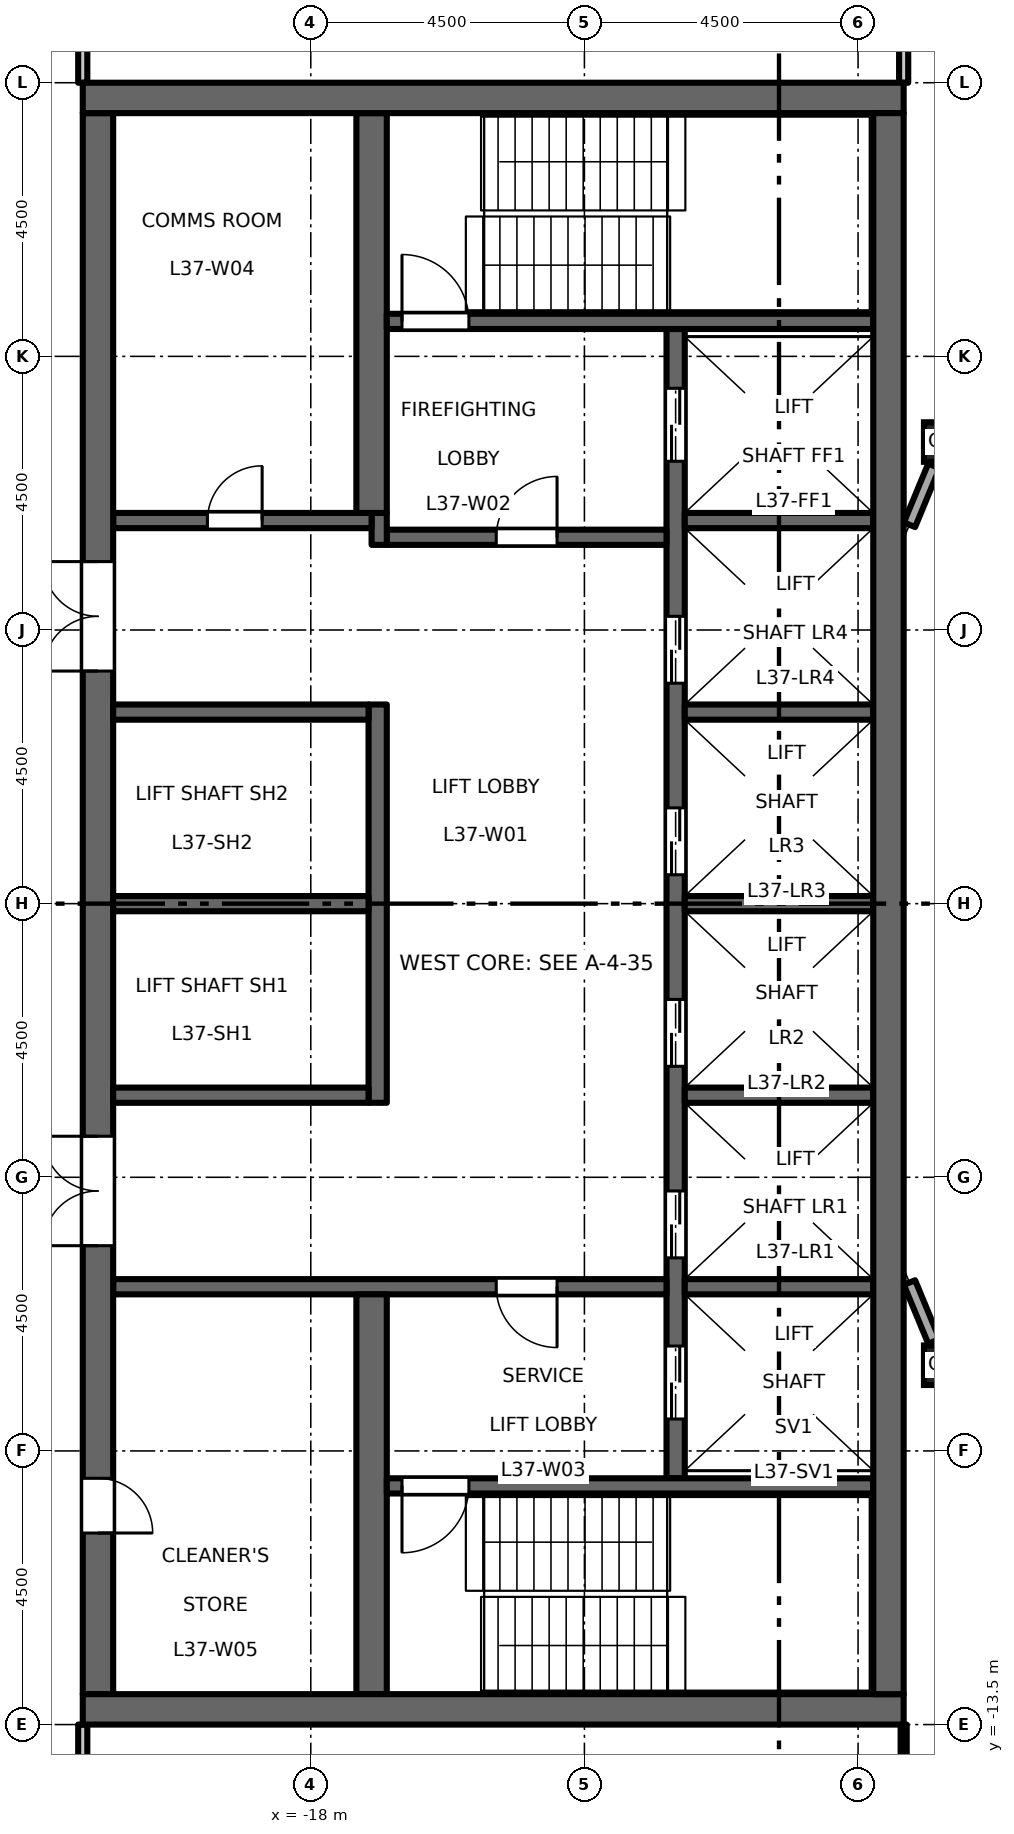
"""IFC4 building model, lengths in metres.
Left out: names, types, materials, properties, quantities, classifications, styles, units other than length and angle.
Written with IfcOpenShell. Run it as: python <this file> out.ifc"""

import sys

from ifc_helpers import new_model, si_unit, direction, frame, frame_2d, origin, origin_2d, place, context, subcontext, project, spatial, rectangle, hollow_rectangle, extrude, element, fill, save


model = new_model("IFC4")
c1 = context("Model", 3, precision=1e-05, world=origin(), true_north=direction((0.0, 1.0)))
c2 = subcontext(c1, "Body", "Model", "MODEL_VIEW")
j1 = project(units=[si_unit("LENGTHUNIT", "METRE"), si_unit("PLANEANGLEUNIT", "RADIAN")], contexts=[c1])
p1 = place(None, origin())
s1 = spatial("IfcSite", under=j1, at=p1, CompositionType="ELEMENT")
p2 = place(p1, origin())
s2 = spatial("IfcBuilding", under=s1, at=p2, CompositionType="ELEMENT")
p3 = place(p2, frame((0.0, 0.0, 172.2)))
s3 = spatial("IfcBuildingStorey", under=s2, at=p3, CompositionType="ELEMENT", Elevation=172.2)
for number, where, z_axis, x_axis in (
    (1, (-7.591, -7.591, 0.0), (0.0, 0.0, 1.0), (1.0, 0.0, 0.0)),
    (2, (-7.591, 7.591, 0.0), (0.0, 0.0, 1.0), (1.0, 0.0, 0.0)),
):
    element("IfcColumn", number, at=place(p3, frame(where, z_axis=z_axis, x_axis=x_axis)), inside=s3, PredefinedType="COLUMN", context=c2, shape_type="SweptSolid", body=[
        extrude(hollow_rectangle(XDim=0.65, YDim=0.65, WallThickness=0.036, at=origin_2d()), origin(), (0.0, 0.0, 1.0), 4.5),
    ])
p4 = place(p3, frame((-12.0, -9.45, 0.0), z_axis=(0.0, 0.0, 1.0), x_axis=(0.0, 1.0, 0.0)))
e3 = element("IfcWall", 3, at=p4, inside=s3, PredefinedType="SHEAR", context=c2, shape_type="SweptSolid", body=[
    extrude(rectangle(XDim=18.9, YDim=0.3, at=frame_2d((9.45, 0.0))), origin(), (0.0, 0.0, 1.0), 4.35),
])
p5 = place(p4, frame((3.625, 0.0, 0.0)))
e4 = element("IfcOpeningElement", 4, at=p5, cuts=e3, PredefinedType="OPENING", context=c2, shape_type="SweptSolid", body=[
    extrude(rectangle(XDim=1.1, YDim=2.1, at=frame_2d((0.55, 1.05))), frame((0.0, 0.16, 0.0), z_axis=(0.0, -1.0, 0.0), x_axis=(1.0, 0.0, 0.0)), (0.0, 0.0, 1.0), 0.32),
])
p6 = place(p4, frame((6.775, 0.0, 0.0)))
e5 = element("IfcOpeningElement", 5, at=p6, cuts=e3, PredefinedType="OPENING", context=c2, shape_type="SweptSolid", body=[
    extrude(rectangle(XDim=1.1, YDim=2.1, at=frame_2d((0.55, 1.05))), frame((0.0, 0.16, 0.0), z_axis=(0.0, -1.0, 0.0), x_axis=(1.0, 0.0, 0.0)), (0.0, 0.0, 1.0), 0.32),
])
p7 = place(p4, frame((9.925, 0.0, 0.0)))
e6 = element("IfcOpeningElement", 6, at=p7, cuts=e3, PredefinedType="OPENING", context=c2, shape_type="SweptSolid", body=[
    extrude(rectangle(XDim=1.1, YDim=2.1, at=frame_2d((0.55, 1.05))), frame((0.0, 0.16, 0.0), z_axis=(0.0, -1.0, 0.0), x_axis=(1.0, 0.0, 0.0)), (0.0, 0.0, 1.0), 0.32),
])
p8 = place(p4, frame((13.075, 0.0, 0.0)))
e7 = element("IfcOpeningElement", 7, at=p8, cuts=e3, PredefinedType="OPENING", context=c2, shape_type="SweptSolid", body=[
    extrude(rectangle(XDim=1.1, YDim=2.1, at=frame_2d((0.55, 1.05))), frame((0.0, 0.16, 0.0), z_axis=(0.0, -1.0, 0.0), x_axis=(1.0, 0.0, 0.0)), (0.0, 0.0, 1.0), 0.32),
])
p9 = place(p4, frame((16.725, 0.0, 0.0)))
e8 = element("IfcOpeningElement", 8, at=p9, cuts=e3, PredefinedType="OPENING", context=c2, shape_type="SweptSolid", body=[
    extrude(rectangle(XDim=1.2, YDim=2.1, at=frame_2d((0.6, 1.05))), frame((0.0, 0.16, 0.0), z_axis=(0.0, -1.0, 0.0), x_axis=(1.0, 0.0, 0.0)), (0.0, 0.0, 1.0), 0.32),
])
p10 = place(p4, frame((0.975, 0.0, 0.0)))
e9 = element("IfcOpeningElement", 9, at=p10, cuts=e3, PredefinedType="OPENING", context=c2, shape_type="SweptSolid", body=[
    extrude(rectangle(XDim=1.2, YDim=2.1, at=frame_2d((0.6, 1.05))), frame((0.0, 0.16, 0.0), z_axis=(0.0, -1.0, 0.0), x_axis=(1.0, 0.0, 0.0)), (0.0, 0.0, 1.0), 0.32),
])
p11 = place(p3, frame((-12.15, 6.025, 0.0), z_axis=(0.0, 0.0, 1.0), x_axis=(-1.0, 0.0, 0.0)))
e10 = element("IfcWall", 10, at=p11, inside=s3, PredefinedType="SHEAR", context=c2, shape_type="SweptSolid", body=[
    extrude(rectangle(XDim=4.6, YDim=0.25, at=frame_2d((2.3, 0.0))), origin(), (0.0, 0.0, 1.0), 4.35),
])
p12 = place(p11, frame((1.8, 0.0, 0.0)))
e11 = element("IfcOpeningElement", 11, at=p12, cuts=e10, PredefinedType="OPENING", context=c2, shape_type="SweptSolid", body=[
    extrude(rectangle(XDim=1.0, YDim=2.1, at=frame_2d((0.5, 1.05))), frame((0.0, 0.135, 0.0), z_axis=(0.0, -1.0, 0.0), x_axis=(1.0, 0.0, 0.0)), (0.0, 0.0, 1.0), 0.27),
])
p13 = place(p3, frame((-16.875, 5.9, 0.0), z_axis=(0.0, 0.0, 1.0), x_axis=(0.0, 1.0, 0.0)))
e12 = element("IfcWall", 12, at=p13, inside=s3, PredefinedType="SHEAR", context=c2, shape_type="SweptSolid", body=[
    extrude(rectangle(XDim=0.525, YDim=0.25, at=frame_2d((0.263, 0.0))), origin(), (0.0, 0.0, 1.0), 4.35),
])
p14 = place(p3, frame((-17.0, 6.3, 0.0), z_axis=(0.0, 0.0, 1.0), x_axis=(-1.0, 0.0, 0.0)))
e13 = element("IfcWall", 13, at=p14, inside=s3, PredefinedType="SHEAR", context=c2, shape_type="SweptSolid", body=[
    extrude(rectangle(XDim=4.25, YDim=0.25, at=frame_2d((2.125, 0.0))), origin(), (0.0, 0.0, 1.0), 4.35),
])
p15 = place(p14, frame((1.8, 0.0, 0.0)))
e14 = element("IfcOpeningElement", 14, at=p15, cuts=e13, PredefinedType="OPENING", context=c2, shape_type="SweptSolid", body=[
    extrude(rectangle(XDim=0.9, YDim=2.1, at=frame_2d((0.45, 1.05))), frame((0.0, 0.135, 0.0), z_axis=(0.0, -1.0, 0.0), x_axis=(1.0, 0.0, 0.0)), (0.0, 0.0, 1.0), 0.27),
])
p16 = place(p3, frame((-12.15, -6.3, 0.0), z_axis=(0.0, 0.0, 1.0), x_axis=(-1.0, 0.0, 0.0)))
e15 = element("IfcWall", 15, at=p16, inside=s3, PredefinedType="SHEAR", context=c2, shape_type="SweptSolid", body=[
    extrude(rectangle(XDim=9.1, YDim=0.25, at=frame_2d((4.55, 0.0))), origin(), (0.0, 0.0, 1.0), 4.35),
])
p17 = place(p16, frame((1.8, 0.0, 0.0)))
e16 = element("IfcOpeningElement", 16, at=p17, cuts=e15, PredefinedType="OPENING", context=c2, shape_type="SweptSolid", body=[
    extrude(rectangle(XDim=1.0, YDim=2.1, at=frame_2d((0.5, 1.05))), frame((0.0, 0.135, 0.0), z_axis=(0.0, -1.0, 0.0), x_axis=(1.0, 0.0, 0.0)), (0.0, 0.0, 1.0), 0.27),
])
p18 = place(p3, frame((-21.5, -13.0, 0.0), z_axis=(0.0, 0.0, 1.0), x_axis=(0.0, 1.0, 0.0)))
e17 = element("IfcWall", 17, at=p18, inside=s3, PredefinedType="SHEAR", context=c2, shape_type="SweptSolid", body=[
    extrude(rectangle(XDim=26.0, YDim=0.5, at=frame_2d((13.0, 0.0))), origin(), (0.0, 0.0, 1.0), 4.35),
])
p19 = place(p18, frame((16.825, 0.0, 0.0)))
e18 = element("IfcOpeningElement", 18, at=p19, cuts=e17, PredefinedType="OPENING", context=c2, shape_type="SweptSolid", body=[
    extrude(rectangle(XDim=1.8, YDim=2.1, at=frame_2d((0.9, 1.05))), frame((0.0, 0.26, 0.0), z_axis=(0.0, -1.0, 0.0), x_axis=(1.0, 0.0, 0.0)), (0.0, 0.0, 1.0), 0.52),
])
p20 = place(p18, frame((7.375, 0.0, 0.0)))
e19 = element("IfcOpeningElement", 19, at=p20, cuts=e17, PredefinedType="OPENING", context=c2, shape_type="SweptSolid", body=[
    extrude(rectangle(XDim=1.8, YDim=2.1, at=frame_2d((0.9, 1.05))), frame((0.0, 0.26, 0.0), z_axis=(0.0, -1.0, 0.0), x_axis=(1.0, 0.0, 0.0)), (0.0, 0.0, 1.0), 0.52),
])
p21 = place(p18, frame((2.65, 0.0, 0.0)))
e20 = element("IfcOpeningElement", 20, at=p21, cuts=e17, PredefinedType="OPENING", context=c2, shape_type="SweptSolid", body=[
    extrude(rectangle(XDim=0.9, YDim=2.1, at=frame_2d((0.45, 1.05))), frame((0.0, 0.26, 0.0), z_axis=(0.0, -1.0, 0.0), x_axis=(1.0, 0.0, 0.0)), (0.0, 0.0, 1.0), 0.52),
])
p22 = place(p3, frame((-16.9, -3.275, 0.0), z_axis=(0.0, 0.0, 1.0), x_axis=(0.0, 1.0, 0.0)))
e21 = element("IfcWall", 21, at=p22, inside=s3, PredefinedType="SHEAR", context=c2, shape_type="SweptSolid", body=[
    extrude(rectangle(XDim=6.55, YDim=0.3, at=frame_2d((3.275, 0.0))), origin(), (0.0, 0.0, 1.0), 4.35),
])
for number, where, z_axis, x_axis in (
    (22, (-17.05, 0.0, 0.0), (0.0, 0.0, 1.0), (-1.0, 0.0, 0.0)),
    (23, (-17.05, 3.15, 0.0), (0.0, 0.0, 1.0), (-1.0, 0.0, 0.0)),
    (24, (-17.05, -3.15, 0.0), (0.0, 0.0, 1.0), (-1.0, 0.0, 0.0)),
):
    element("IfcWall", number, at=place(p3, frame(where, z_axis=z_axis, x_axis=x_axis)), inside=s3, PredefinedType="SHEAR", context=c2, shape_type="SweptSolid", body=[
        extrude(rectangle(XDim=4.2, YDim=0.25, at=frame_2d((2.1, 0.0))), origin(), (0.0, 0.0, 1.0), 4.35),
    ])
for number, where, z_axis, x_axis in (
    (25, (-17.0, 6.425, 0.0), (0.0, 0.0, 1.0), (0.0, 1.0, 0.0)),
    (26, (-17.0, -13.0, 0.0), (0.0, 0.0, 1.0), (0.0, 1.0, 0.0)),
):
    element("IfcWall", number, at=place(p3, frame(where, z_axis=z_axis, x_axis=x_axis)), inside=s3, PredefinedType="SHEAR", context=c2, shape_type="SweptSolid", body=[
        extrude(rectangle(XDim=6.575, YDim=0.5, at=frame_2d((3.288, 0.0))), origin(), (0.0, 0.0, 1.0), 4.35),
    ])
for number, where, z_axis, x_axis in (
    (27, (-8.75, 0.0, 0.0), (0.0, 0.0, 1.0), (-1.0, 0.0, 0.0)),
    (28, (-8.75, 3.15, 0.0), (0.0, 0.0, 1.0), (-1.0, 0.0, 0.0)),
    (29, (-8.75, 6.3, 0.0), (0.0, 0.0, 1.0), (-1.0, 0.0, 0.0)),
    (30, (-8.75, -3.15, 0.0), (0.0, 0.0, 1.0), (-1.0, 0.0, 0.0)),
    (31, (-8.75, -6.3, 0.0), (0.0, 0.0, 1.0), (-1.0, 0.0, 0.0)),
):
    element("IfcWall", number, at=place(p3, frame(where, z_axis=z_axis, x_axis=x_axis)), inside=s3, PredefinedType="SHEAR", context=c2, shape_type="SweptSolid", body=[
        extrude(rectangle(XDim=3.1, YDim=0.25, at=frame_2d((1.55, 0.0))), origin(), (0.0, 0.0, 1.0), 4.35),
    ])
p23 = place(p3, frame((-8.75, 9.575, 0.0), z_axis=(0.0, 0.0, 1.0), x_axis=(-1.0, 0.0, 0.0)))
e32 = element("IfcWall", 32, at=p23, inside=s3, PredefinedType="SHEAR", context=c2, shape_type="SweptSolid", body=[
    extrude(rectangle(XDim=8.0, YDim=0.25, at=frame_2d((4.0, 0.0))), origin(), (0.0, 0.0, 1.0), 4.35),
])
p24 = place(p23, frame((6.65, 0.0, 0.0)))
e33 = element("IfcOpeningElement", 33, at=p24, cuts=e32, PredefinedType="OPENING", context=c2, shape_type="SweptSolid", body=[
    extrude(rectangle(XDim=1.1, YDim=2.1, at=frame_2d((0.55, 1.05))), frame((0.0, 0.135, 0.0), z_axis=(0.0, -1.0, 0.0), x_axis=(1.0, 0.0, 0.0)), (0.0, 0.0, 1.0), 0.27),
])
p25 = place(p3, frame((-8.75, -9.575, 0.0), z_axis=(0.0, 0.0, 1.0), x_axis=(-1.0, 0.0, 0.0)))
e34 = element("IfcWall", 34, at=p25, inside=s3, PredefinedType="SHEAR", context=c2, shape_type="SweptSolid", body=[
    extrude(rectangle(XDim=8.0, YDim=0.25, at=frame_2d((4.0, 0.0))), origin(), (0.0, 0.0, 1.0), 4.35),
])
p26 = place(p25, frame((6.65, 0.0, 0.0)))
e35 = element("IfcOpeningElement", 35, at=p26, cuts=e34, PredefinedType="OPENING", context=c2, shape_type="SweptSolid", body=[
    extrude(rectangle(XDim=1.1, YDim=2.1, at=frame_2d((0.55, 1.05))), frame((0.0, 0.135, 0.0), z_axis=(0.0, -1.0, 0.0), x_axis=(1.0, 0.0, 0.0)), (0.0, 0.0, 1.0), 0.27),
])
for number, where, z_axis, x_axis in (
    (36, (-8.25, 13.25, 0.0), (0.0, 0.0, 1.0), (-1.0, 0.0, 0.0)),
    (37, (-8.25, -13.25, 0.0), (0.0, 0.0, 1.0), (-1.0, 0.0, 0.0)),
):
    element("IfcWall", number, at=place(p3, frame(where, z_axis=z_axis, x_axis=x_axis)), inside=s3, PredefinedType="SHEAR", context=c2, shape_type="SweptSolid", body=[
        extrude(rectangle(XDim=13.5, YDim=0.5, at=frame_2d((6.75, 0.0))), origin(), (0.0, 0.0, 1.0), 4.35),
    ])
p27 = place(p3, frame((-8.5, -13.0, 0.0), z_axis=(0.0, 0.0, 1.0), x_axis=(0.0, 1.0, 0.0)))
e38 = element("IfcWall", 38, at=p27, inside=s3, PredefinedType="SHEAR", context=c2, shape_type="SweptSolid", body=[
    extrude(rectangle(XDim=26.0, YDim=0.5, at=frame_2d((13.0, 0.0))), origin(), (0.0, 0.0, 1.0), 4.35),
])
for number, where, z_axis, x_axis in (
    (39, (-7.753, 7.199, 0.0), (0.0, 0.0, 1.0), (-0.383, -0.924, 0.0)),
    (40, (-8.154, -6.231, 0.0), (0.0, 0.0, 1.0), (0.383, -0.924, 0.0)),
):
    element("IfcWall", number, at=place(p3, frame(where, z_axis=z_axis, x_axis=x_axis)), inside=s3, PredefinedType="STANDARD", context=c2, shape_type="SweptSolid", body=[
        extrude(rectangle(XDim=1.048, YDim=0.2, at=frame_2d((0.524, 0.0))), origin(), (0.0, 0.0, 1.0), 3.826),
    ])
for number, where, z_axis, x_axis in (
    (41, (-21.75, -18.925, 0.0), (0.0, 0.0, 1.0), (0.0, 1.0, 0.0)),
    (42, (-21.75, 13.5, 0.0), (0.0, 0.0, 1.0), (0.0, 1.0, 0.0)),
):
    element("IfcWall", number, at=place(p3, frame(where, z_axis=z_axis, x_axis=x_axis)), inside=s3, PredefinedType="PARTITIONING", context=c2, shape_type="SweptSolid", body=[
        extrude(rectangle(XDim=5.425, YDim=0.15, at=frame_2d((2.712, 0.0))), origin(), (0.0, 0.0, 1.0), 4.35),
    ])
p28 = place(p3, frame((-8.25, -18.925, 0.0), z_axis=(0.0, 0.0, 1.0), x_axis=(0.0, 1.0, 0.0)))
e43 = element("IfcWall", 43, at=p28, inside=s3, PredefinedType="PARTITIONING", context=c2, shape_type="SweptSolid", body=[
    extrude(rectangle(XDim=5.425, YDim=0.1, at=frame_2d((2.712, 0.0))), origin(), (0.0, 0.0, 1.0), 4.35),
])
p29 = place(p3, frame((-8.25, 13.5, 0.0), z_axis=(0.0, 0.0, 1.0), x_axis=(0.0, 1.0, 0.0)))
e44 = element("IfcWall", 44, at=p29, inside=s3, PredefinedType="PARTITIONING", context=c2, shape_type="SweptSolid", body=[
    extrude(rectangle(XDim=5.425, YDim=0.15, at=frame_2d((2.712, 0.0))), origin(), (0.0, 0.0, 1.0), 4.35),
])
p30 = place(p12, origin())
e45 = element("IfcDoor", 45, at=p30, inside=s3, OperationType="SINGLE_SWING_LEFT", PredefinedType="DOOR", context=c2, shape_type="SweptSolid", body=[
    extrude(rectangle(XDim=1.0, YDim=2.1, at=frame_2d((0.5, 1.05))), frame((0.0, 0.025, 0.0), z_axis=(0.0, -1.0, 0.0), x_axis=(1.0, 0.0, 0.0)), (0.0, 0.0, 1.0), 0.05),
])
fill(e11, e45)
p31 = place(p17, origin())
e46 = element("IfcDoor", 46, at=p31, inside=s3, OperationType="SINGLE_SWING_RIGHT", PredefinedType="DOOR", context=c2, shape_type="SweptSolid", body=[
    extrude(rectangle(XDim=1.0, YDim=2.1, at=frame_2d((0.5, 1.05))), frame((0.0, 0.025, 0.0), z_axis=(0.0, -1.0, 0.0), x_axis=(1.0, 0.0, 0.0)), (0.0, 0.0, 1.0), 0.05),
])
fill(e16, e46)
p32 = place(p24, origin())
e47 = element("IfcDoor", 47, at=p32, inside=s3, OperationType="SINGLE_SWING_RIGHT", PredefinedType="DOOR", context=c2, shape_type="SweptSolid", body=[
    extrude(rectangle(XDim=1.1, YDim=2.1, at=frame_2d((0.55, 1.05))), frame((0.0, 0.025, 0.0), z_axis=(0.0, -1.0, 0.0), x_axis=(1.0, 0.0, 0.0)), (0.0, 0.0, 1.0), 0.05),
])
fill(e33, e47)
p33 = place(p26, origin())
e48 = element("IfcDoor", 48, at=p33, inside=s3, OperationType="SINGLE_SWING_LEFT", PredefinedType="DOOR", context=c2, shape_type="SweptSolid", body=[
    extrude(rectangle(XDim=1.1, YDim=2.1, at=frame_2d((0.55, 1.05))), frame((0.0, 0.025, 0.0), z_axis=(0.0, -1.0, 0.0), x_axis=(1.0, 0.0, 0.0)), (0.0, 0.0, 1.0), 0.05),
])
fill(e35, e48)
p34 = place(p19, origin())
e49 = element("IfcDoor", 49, at=p34, inside=s3, OperationType="DOUBLE_DOOR_DOUBLE_SWING", PredefinedType="DOOR", context=c2, shape_type="SweptSolid", body=[
    extrude(rectangle(XDim=1.8, YDim=2.1, at=frame_2d((0.9, 1.05))), frame((0.0, 0.025, 0.0), z_axis=(0.0, -1.0, 0.0), x_axis=(1.0, 0.0, 0.0)), (0.0, 0.0, 1.0), 0.05),
])
fill(e18, e49)
p35 = place(p20, origin())
e50 = element("IfcDoor", 50, at=p35, inside=s3, OperationType="DOUBLE_DOOR_DOUBLE_SWING", PredefinedType="DOOR", context=c2, shape_type="SweptSolid", body=[
    extrude(rectangle(XDim=1.8, YDim=2.1, at=frame_2d((0.9, 1.05))), frame((0.0, 0.025, 0.0), z_axis=(0.0, -1.0, 0.0), x_axis=(1.0, 0.0, 0.0)), (0.0, 0.0, 1.0), 0.05),
])
fill(e19, e50)
p36 = place(p5, origin())
e51 = element("IfcDoor", 51, at=p36, inside=s3, OperationType="DOUBLE_DOOR_SLIDING", PredefinedType="DOOR", context=c2, shape_type="SweptSolid", body=[
    extrude(rectangle(XDim=1.1, YDim=2.1, at=frame_2d((0.55, 1.05))), frame((0.0, 0.025, 0.0), z_axis=(0.0, -1.0, 0.0), x_axis=(1.0, 0.0, 0.0)), (0.0, 0.0, 1.0), 0.05),
])
fill(e4, e51)
p37 = place(p6, origin())
e52 = element("IfcDoor", 52, at=p37, inside=s3, OperationType="DOUBLE_DOOR_SLIDING", PredefinedType="DOOR", context=c2, shape_type="SweptSolid", body=[
    extrude(rectangle(XDim=1.1, YDim=2.1, at=frame_2d((0.55, 1.05))), frame((0.0, 0.025, 0.0), z_axis=(0.0, -1.0, 0.0), x_axis=(1.0, 0.0, 0.0)), (0.0, 0.0, 1.0), 0.05),
])
fill(e5, e52)
p38 = place(p7, origin())
e53 = element("IfcDoor", 53, at=p38, inside=s3, OperationType="DOUBLE_DOOR_SLIDING", PredefinedType="DOOR", context=c2, shape_type="SweptSolid", body=[
    extrude(rectangle(XDim=1.1, YDim=2.1, at=frame_2d((0.55, 1.05))), frame((0.0, 0.025, 0.0), z_axis=(0.0, -1.0, 0.0), x_axis=(1.0, 0.0, 0.0)), (0.0, 0.0, 1.0), 0.05),
])
fill(e6, e53)
p39 = place(p8, origin())
e54 = element("IfcDoor", 54, at=p39, inside=s3, OperationType="DOUBLE_DOOR_SLIDING", PredefinedType="DOOR", context=c2, shape_type="SweptSolid", body=[
    extrude(rectangle(XDim=1.1, YDim=2.1, at=frame_2d((0.55, 1.05))), frame((0.0, 0.025, 0.0), z_axis=(0.0, -1.0, 0.0), x_axis=(1.0, 0.0, 0.0)), (0.0, 0.0, 1.0), 0.05),
])
fill(e7, e54)
p40 = place(p9, origin())
e55 = element("IfcDoor", 55, at=p40, inside=s3, OperationType="DOUBLE_DOOR_SLIDING", PredefinedType="DOOR", context=c2, shape_type="SweptSolid", body=[
    extrude(rectangle(XDim=1.2, YDim=2.1, at=frame_2d((0.6, 1.05))), frame((0.0, 0.025, 0.0), z_axis=(0.0, -1.0, 0.0), x_axis=(1.0, 0.0, 0.0)), (0.0, 0.0, 1.0), 0.05),
])
fill(e8, e55)
p41 = place(p10, origin())
e56 = element("IfcDoor", 56, at=p41, inside=s3, OperationType="DOUBLE_DOOR_SLIDING", PredefinedType="DOOR", context=c2, shape_type="SweptSolid", body=[
    extrude(rectangle(XDim=1.2, YDim=2.1, at=frame_2d((0.6, 1.05))), frame((0.0, 0.025, 0.0), z_axis=(0.0, -1.0, 0.0), x_axis=(1.0, 0.0, 0.0)), (0.0, 0.0, 1.0), 0.05),
])
fill(e9, e56)
p42 = place(p15, origin())
e57 = element("IfcDoor", 57, at=p42, inside=s3, OperationType="SINGLE_SWING_LEFT", PredefinedType="DOOR", context=c2, shape_type="SweptSolid", body=[
    extrude(rectangle(XDim=0.9, YDim=2.1, at=frame_2d((0.45, 1.05))), frame((0.0, 0.025, 0.0), z_axis=(0.0, -1.0, 0.0), x_axis=(1.0, 0.0, 0.0)), (0.0, 0.0, 1.0), 0.05),
])
fill(e14, e57)
p43 = place(p21, origin())
e58 = element("IfcDoor", 58, at=p43, inside=s3, OperationType="SINGLE_SWING_LEFT", PredefinedType="DOOR", context=c2, shape_type="SweptSolid", body=[
    extrude(rectangle(XDim=0.9, YDim=2.1, at=frame_2d((0.45, 1.05))), frame((0.0, 0.025, 0.0), z_axis=(0.0, -1.0, 0.0), x_axis=(1.0, 0.0, 0.0)), (0.0, 0.0, 1.0), 0.05),
])
fill(e20, e58)
save(model, sys.argv[1])
